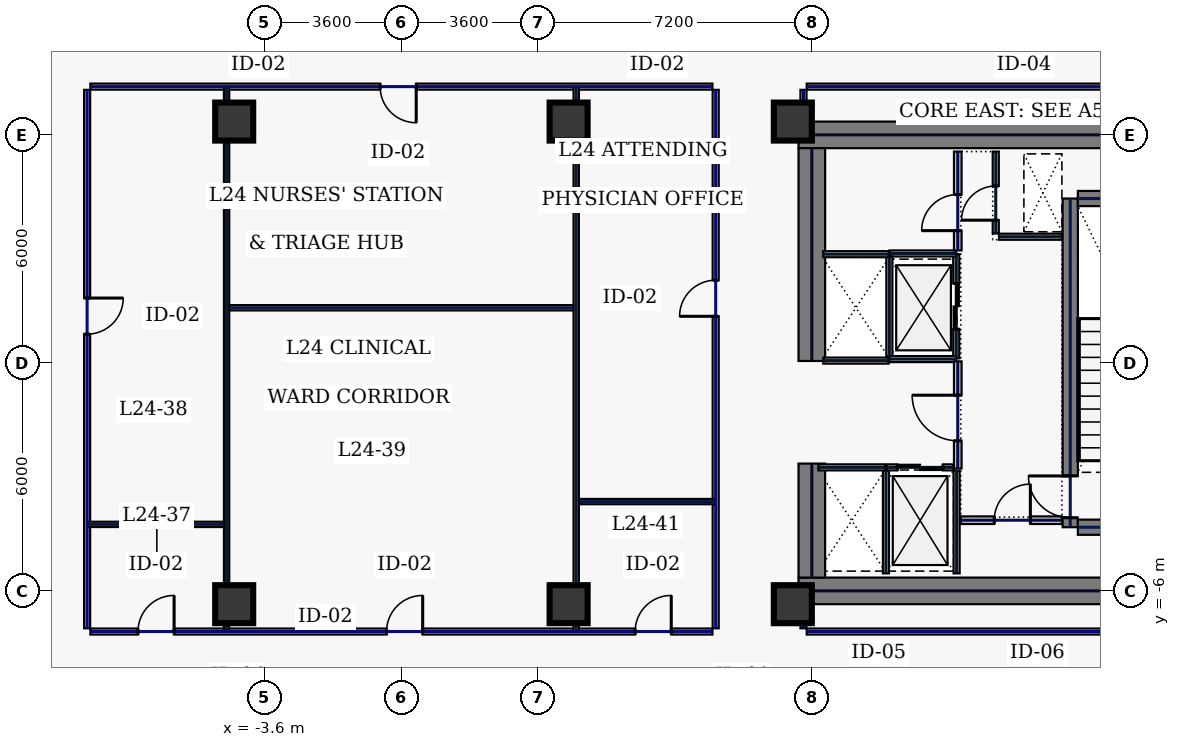
"""IFC4 building model, lengths in metres.
Left out: names, types, materials, properties, quantities, classifications, styles, units other than length and angle.
Written with IfcOpenShell. Run it as: python <this file> out.ifc"""

import sys

from ifc_helpers import new_model, si_unit, direction, frame, frame_2d, origin, origin_2d, place, context, subcontext, project, spatial, rectangle, hollow_rectangle, extrude, element, fill, save


model = new_model("IFC4")
c1 = context("Model", 3, precision=1e-05, world=origin(), true_north=direction((0.0, 1.0)))
c2 = subcontext(c1, "Body", "Model", "MODEL_VIEW")
j1 = project(units=[si_unit("LENGTHUNIT", "METRE"), si_unit("PLANEANGLEUNIT", "RADIAN")], contexts=[c1])
p1 = place(None, origin())
s1 = spatial("IfcSite", under=j1, at=p1, CompositionType="ELEMENT")
p2 = place(p1, origin())
s2 = spatial("IfcBuilding", under=s1, at=p2, CompositionType="ELEMENT")
p3 = place(p2, frame((0.0, 0.0, 109.4)))
s3 = spatial("IfcBuildingStorey", under=s2, at=p3, CompositionType="ELEMENT", Elevation=109.4)
for number, where, z_axis, x_axis in (
    (1, (10.45, 6.0, 0.0), (0.0, 0.0, 1.0), (1.0, 0.0, 0.0)),
    (2, (10.45, -6.0, 0.0), (0.0, 0.0, 1.0), (1.0, 0.0, 0.0)),
):
    element("IfcWall", number, at=place(p3, frame(where, z_axis=z_axis, x_axis=x_axis)), inside=s3, PredefinedType="SHEAR", context=c2, shape_type="SweptSolid", body=[
        extrude(rectangle(XDim=11.55, YDim=0.7, at=frame_2d((5.775, 0.0))), origin(), (0.0, 0.0, 1.0), 3.74),
    ])
p4 = place(p3, frame((10.8, -5.65, 0.0), z_axis=(0.0, 0.0, 1.0), x_axis=(0.0, 1.0, 0.0)))
e3 = element("IfcWall", 3, at=p4, inside=s3, PredefinedType="SHEAR", context=c2, shape_type="SweptSolid", body=[
    extrude(rectangle(XDim=3.0, YDim=0.7, at=frame_2d((1.5, 0.0))), origin(), (0.0, 0.0, 1.0), 3.74),
])
p5 = place(p3, frame((10.8, 0.05, 0.0), z_axis=(0.0, 0.0, 1.0), x_axis=(0.0, 1.0, 0.0)))
e4 = element("IfcWall", 4, at=p5, inside=s3, PredefinedType="SHEAR", context=c2, shape_type="SweptSolid", body=[
    extrude(rectangle(XDim=5.6, YDim=0.7, at=frame_2d((2.8, 0.0))), origin(), (0.0, 0.0, 1.0), 3.74),
])
p6 = place(p3, frame((17.6, -4.325, 0.0), z_axis=(0.0, 0.0, 1.0), x_axis=(0.0, 1.0, 0.0)))
e5 = element("IfcWall", 5, at=p6, inside=s3, PredefinedType="SHEAR", context=c2, shape_type="SweptSolid", body=[
    extrude(rectangle(XDim=8.65, YDim=0.4, at=frame_2d((4.325, 0.0))), origin(), (0.0, 0.0, 1.0), 3.74),
])
p7 = place(p6, frame((0.25, 0.0, 0.0)))
e6 = element("IfcOpeningElement", 6, at=p7, cuts=e5, PredefinedType="OPENING", context=c2, shape_type="SweptSolid", body=[
    extrude(rectangle(XDim=1.1, YDim=2.2, at=frame_2d((0.55, 1.1))), frame((0.0, 0.21, 0.0), z_axis=(0.0, -1.0, 0.0), x_axis=(1.0, 0.0, 0.0)), (0.0, 0.0, 1.0), 0.42),
])
for number, where, z_axis, x_axis in (
    (7, (17.8, -4.325, 0.0), (0.0, 0.0, 1.0), (1.0, 0.0, 0.0)),
    (8, (17.8, 4.325, 0.0), (0.0, 0.0, 1.0), (1.0, 0.0, 0.0)),
):
    element("IfcWall", number, at=place(p3, frame(where, z_axis=z_axis, x_axis=x_axis)), inside=s3, PredefinedType="SHEAR", context=c2, shape_type="SweptSolid", body=[
        extrude(rectangle(XDim=3.4, YDim=0.4, at=frame_2d((1.7, 0.0))), origin(), (0.0, 0.0, 1.0), 3.74),
    ])
for number, where, z_axis, x_axis in (
    (9, (10.3, -6.35, 0.0), (0.0, 0.0, 1.0), (1.0, 0.0, 0.0)),
    (10, (10.3, 6.35, 0.0), (0.0, 0.0, 1.0), (1.0, 0.0, 0.0)),
    (11, (-4.4, -6.35, 0.0), (0.0, 0.0, 1.0), (1.0, 0.0, 0.0)),
    (12, (4.4, -6.35, 0.0), (0.0, 0.0, 1.0), (1.0, 0.0, 0.0)),
    (13, (-4.4, 6.35, 0.0), (0.0, 0.0, 1.0), (1.0, 0.0, 0.0)),
    (14, (4.4, 6.35, 0.0), (0.0, 0.0, 1.0), (1.0, 0.0, 0.0)),
):
    element("IfcColumn", number, at=place(p3, frame(where, z_axis=z_axis, x_axis=x_axis)), inside=s3, PredefinedType="COLUMN", context=c2, shape_type="SweptSolid", body=[
        extrude(hollow_rectangle(XDim=1.0, YDim=1.0, WallThickness=0.045, at=origin_2d()), origin(), (0.0, 0.0, 1.0), 3.74),
    ])
p8 = place(p3, frame((14.6, 0.12, 0.0), z_axis=(0.0, 0.0, 1.0), x_axis=(0.0, 1.0, 0.0)))
e15 = element("IfcWall", 15, at=p8, inside=s3, PredefinedType="PARTITIONING", context=c2, shape_type="SweptSolid", body=[
    extrude(rectangle(XDim=2.74, YDim=0.16, at=frame_2d((1.37, 0.0))), origin(), (0.0, 0.0, 1.0), 3.74),
])
p9 = place(p8, frame((0.77, 0.0, 0.0)))
e16 = element("IfcOpeningElement", 16, at=p9, cuts=e15, PredefinedType="OPENING", context=c2, shape_type="SweptSolid", body=[
    extrude(rectangle(XDim=1.2, YDim=2.2, at=frame_2d((0.6, 1.1))), frame((0.0, 0.09, 0.0), z_axis=(0.0, -1.0, 0.0), x_axis=(1.0, 0.0, 0.0)), (0.0, 0.0, 1.0), 0.18),
])
for number, where, z_axis, x_axis in (
    (17, (12.84, 0.1, 0.0), (0.0, 0.0, 1.0), (1.0, 0.0, 0.0)),
    (18, (12.84, 2.88, 0.0), (0.0, 0.0, 1.0), (1.0, 0.0, 0.0)),
):
    element("IfcWall", number, at=place(p3, frame(where, z_axis=z_axis, x_axis=x_axis)), inside=s3, PredefinedType="PARTITIONING", context=c2, shape_type="SweptSolid", body=[
        extrude(rectangle(XDim=1.76, YDim=0.16, at=frame_2d((0.88, 0.0))), origin(), (0.0, 0.0, 1.0), 3.74),
    ])
p10 = place(p3, frame((12.84, 0.18, 0.0), z_axis=(0.0, 0.0, 1.0), x_axis=(0.0, 1.0, 0.0)))
e19 = element("IfcWall", 19, at=p10, inside=s3, PredefinedType="PARTITIONING", context=c2, shape_type="SweptSolid", body=[
    extrude(rectangle(XDim=2.62, YDim=0.16, at=frame_2d((1.31, 0.0))), origin(), (0.0, 0.0, 1.0), 3.74),
])
p11 = place(p3, frame((12.77, -2.75, 0.0), z_axis=(0.0, 0.0, 1.0), x_axis=(1.0, 0.0, 0.0)))
e20 = element("IfcWall", 20, at=p11, inside=s3, PredefinedType="PARTITIONING", context=c2, shape_type="SweptSolid", body=[
    extrude(rectangle(XDim=1.76, YDim=0.16, at=frame_2d((0.88, 0.0))), origin(), (0.0, 0.0, 1.0), 3.74),
])
p12 = place(p11, frame((0.28, 0.0, 0.0)))
e21 = element("IfcOpeningElement", 21, at=p12, cuts=e20, PredefinedType="OPENING", context=c2, shape_type="SweptSolid", body=[
    extrude(rectangle(XDim=1.2, YDim=2.2, at=frame_2d((0.6, 1.1))), frame((0.0, 0.09, 0.0), z_axis=(0.0, -1.0, 0.0), x_axis=(1.0, 0.0, 0.0)), (0.0, 0.0, 1.0), 0.18),
])
for number, where, z_axis, x_axis in (
    (22, (12.75, -5.54, 0.0), (0.0, 0.0, 1.0), (0.0, 1.0, 0.0)),
    (23, (14.61, -5.54, 0.0), (0.0, 0.0, 1.0), (0.0, 1.0, 0.0)),
):
    element("IfcWall", number, at=place(p3, frame(where, z_axis=z_axis, x_axis=x_axis)), inside=s3, PredefinedType="PARTITIONING", context=c2, shape_type="SweptSolid", body=[
        extrude(rectangle(XDim=2.7, YDim=0.16, at=frame_2d((1.35, 0.0))), origin(), (0.0, 0.0, 1.0), 3.74),
    ])
p13 = place(p3, frame((10.97, -2.75, 0.0), z_axis=(0.0, 0.0, 1.0), x_axis=(1.0, 0.0, 0.0)))
e24 = element("IfcWall", 24, at=p13, inside=s3, PredefinedType="PARTITIONING", context=c2, shape_type="SweptSolid", body=[
    extrude(rectangle(XDim=1.76, YDim=0.16, at=frame_2d((0.88, 0.0))), origin(), (0.0, 0.0, 1.0), 3.74),
])
for number, where, z_axis, x_axis in (
    (25, (11.1, 0.06, 0.0), (0.0, 0.0, 1.0), (1.0, 0.0, 0.0)),
    (26, (11.1, 2.86, 0.0), (0.0, 0.0, 1.0), (1.0, 0.0, 0.0)),
):
    element("IfcWall", number, at=place(p3, frame(where, z_axis=z_axis, x_axis=x_axis)), inside=s3, PredefinedType="PARTITIONING", context=c2, shape_type="SweptSolid", body=[
        extrude(rectangle(XDim=1.72, YDim=0.16, at=frame_2d((0.86, 0.0))), origin(), (0.0, 0.0, 1.0), 3.74),
    ])
p14 = place(p3, frame((15.64, 3.405, 0.0), z_axis=(0.0, 0.0, 1.0), x_axis=(0.0, 1.0, 0.0)))
e27 = element("IfcWall", 27, at=p14, inside=s3, PredefinedType="PARTITIONING", context=c2, shape_type="SweptSolid", body=[
    extrude(rectangle(XDim=2.155, YDim=0.16, at=frame_2d((1.078, 0.0))), origin(), (0.0, 0.0, 1.0), 3.74),
])
p15 = place(p14, frame((0.35, 0.0, 0.0)))
e28 = element("IfcOpeningElement", 28, at=p15, cuts=e27, PredefinedType="OPENING", context=c2, shape_type="SweptSolid", body=[
    extrude(rectangle(XDim=0.9, YDim=2.2, at=frame_2d((0.45, 1.1))), frame((0.0, 0.09, 0.0), z_axis=(0.0, -1.0, 0.0), x_axis=(1.0, 0.0, 0.0)), (0.0, 0.0, 1.0), 0.18),
])
p16 = place(p3, frame((15.725, 3.32, 0.0), z_axis=(0.0, 0.0, 1.0), x_axis=(1.0, 0.0, 0.0)))
e29 = element("IfcWall", 29, at=p16, inside=s3, PredefinedType="PARTITIONING", context=c2, shape_type="SweptSolid", body=[
    extrude(rectangle(XDim=1.655, YDim=0.16, at=frame_2d((0.827, 0.0))), origin(), (0.0, 0.0, 1.0), 3.74),
])
p17 = place(p3, frame((14.72, -4.14, 0.0), z_axis=(0.0, 0.0, 1.0), x_axis=(1.0, 0.0, 0.0)))
e30 = element("IfcWall", 30, at=p17, inside=s3, PredefinedType="SOLIDWALL", context=c2, shape_type="SweptSolid", body=[
    extrude(rectangle(XDim=2.66, YDim=0.2, at=frame_2d((1.33, 0.0))), origin(), (0.0, 0.0, 1.0), 3.74),
])
p18 = place(p17, frame((0.88, 0.0, 0.0)))
e31 = element("IfcOpeningElement", 31, at=p18, cuts=e30, PredefinedType="OPENING", context=c2, shape_type="SweptSolid", body=[
    extrude(rectangle(XDim=0.95, YDim=2.2, at=frame_2d((0.475, 1.1))), frame((0.0, 0.11, 0.0), z_axis=(0.0, -1.0, 0.0), x_axis=(1.0, 0.0, 0.0)), (0.0, 0.0, 1.0), 0.22),
])
p19 = place(p3, frame((14.64, 2.96, 0.0), z_axis=(0.0, 0.0, 1.0), x_axis=(0.0, 1.0, 0.0)))
e32 = element("IfcWall", 32, at=p19, inside=s3, PredefinedType="SOLIDWALL", context=c2, shape_type="SweptSolid", body=[
    extrude(rectangle(XDim=2.6, YDim=0.2, at=frame_2d((1.3, 0.0))), origin(), (0.0, 0.0, 1.0), 3.74),
])
p20 = place(p19, frame((0.52, 0.0, 0.0)))
e33 = element("IfcOpeningElement", 33, at=p20, cuts=e32, PredefinedType="OPENING", context=c2, shape_type="SweptSolid", body=[
    extrude(rectangle(XDim=0.95, YDim=2.2, at=frame_2d((0.475, 1.1))), frame((0.0, 0.11, 0.0), z_axis=(0.0, -1.0, 0.0), x_axis=(1.0, 0.0, 0.0)), (0.0, 0.0, 1.0), 0.22),
])
p21 = place(p3, frame((14.64, -2.78, 0.0), z_axis=(0.0, 0.0, 1.0), x_axis=(0.0, 1.0, 0.0)))
e34 = element("IfcWall", 34, at=p21, inside=s3, PredefinedType="SOLIDWALL", context=c2, shape_type="SweptSolid", body=[
    extrude(rectangle(XDim=2.82, YDim=0.2, at=frame_2d((1.41, 0.0))), origin(), (0.0, 0.0, 1.0), 3.74),
])
p22 = place(p21, frame((0.73, 0.0, 0.0)))
e35 = element("IfcOpeningElement", 35, at=p22, cuts=e34, PredefinedType="OPENING", context=c2, shape_type="SweptSolid", body=[
    extrude(rectangle(XDim=1.2, YDim=2.2, at=frame_2d((0.6, 1.1))), frame((0.0, 0.11, 0.0), z_axis=(0.0, -1.0, 0.0), x_axis=(1.0, 0.0, 0.0)), (0.0, 0.0, 1.0), 0.22),
])
p23 = place(p3, frame((25.235, 7.27, 0.0), z_axis=(0.0, 0.0, 1.0), x_axis=(-1.0, 0.0, 0.0)))
e36 = element("IfcWall", 36, at=p23, inside=s3, PredefinedType="PARTITIONING", context=c2, shape_type="SweptSolid", body=[
    extrude(rectangle(XDim=14.57, YDim=0.16, at=frame_2d((7.285, 0.0))), origin(), (0.0, 0.0, 1.0), 3.74),
])
p24 = place(p3, frame((10.58, 7.185, 0.0), z_axis=(0.0, 0.0, 1.0), x_axis=(0.0, -1.0, 0.0)))
e37 = element("IfcWall", 37, at=p24, inside=s3, PredefinedType="PARTITIONING", context=c2, shape_type="SweptSolid", body=[
    extrude(rectangle(XDim=0.765, YDim=0.16, at=frame_2d((0.383, 0.0))), origin(), (0.0, 0.0, 1.0), 1.535),
])
p25 = place(p3, frame((10.58, -6.42, 0.0), z_axis=(0.0, 0.0, 1.0), x_axis=(0.0, -1.0, 0.0)))
e38 = element("IfcWall", 38, at=p25, inside=s3, PredefinedType="PARTITIONING", context=c2, shape_type="SweptSolid", body=[
    extrude(rectangle(XDim=0.565, YDim=0.16, at=frame_2d((0.283, 0.0))), origin(), (0.0, 0.0, 1.0), 3.74),
])
p26 = place(p3, frame((10.665, -7.07, 0.0), z_axis=(0.0, 0.0, 1.0), x_axis=(1.0, 0.0, 0.0)))
e39 = element("IfcWall", 39, at=p26, inside=s3, PredefinedType="PARTITIONING", context=c2, shape_type="SweptSolid", body=[
    extrude(rectangle(XDim=14.57, YDim=0.16, at=frame_2d((7.285, 0.0))), origin(), (0.0, 0.0, 1.0), 3.74),
])
p27 = place(p3, frame((8.27, -6.985, 0.0), z_axis=(0.0, 0.0, 1.0), x_axis=(0.0, 1.0, 0.0)))
e40 = element("IfcWall", 40, at=p27, inside=s3, PredefinedType="PARTITIONING", context=c2, shape_type="SweptSolid", body=[
    extrude(rectangle(XDim=14.17, YDim=0.16, at=frame_2d((7.085, 0.0))), origin(), (0.0, 0.0, 1.0), 3.74),
])
p28 = place(p27, frame((8.211, 0.0, 0.0)))
e41 = element("IfcOpeningElement", 41, at=p28, cuts=e40, PredefinedType="OPENING", context=c2, shape_type="SweptSolid", body=[
    extrude(rectangle(XDim=0.95, YDim=2.2, at=frame_2d((0.475, 1.1))), frame((0.0, 0.09, 0.0), z_axis=(0.0, -1.0, 0.0), x_axis=(1.0, 0.0, 0.0)), (0.0, 0.0, 1.0), 0.18),
])
p29 = place(p3, frame((8.185, 7.27, 0.0), z_axis=(0.0, 0.0, 1.0), x_axis=(-1.0, 0.0, 0.0)))
e42 = element("IfcWall", 42, at=p29, inside=s3, PredefinedType="PARTITIONING", context=c2, shape_type="SweptSolid", body=[
    extrude(rectangle(XDim=16.37, YDim=0.16, at=frame_2d((8.185, 0.0))), origin(), (0.0, 0.0, 1.0), 3.74),
])
p30 = place(p29, frame((7.795, 0.0, 0.0)))
e43 = element("IfcOpeningElement", 43, at=p30, cuts=e42, PredefinedType="OPENING", context=c2, shape_type="SweptSolid", body=[
    extrude(rectangle(XDim=0.95, YDim=2.2, at=frame_2d((0.475, 1.1))), frame((0.0, 0.09, 0.0), z_axis=(0.0, -1.0, 0.0), x_axis=(1.0, 0.0, 0.0)), (0.0, 0.0, 1.0), 0.18),
])
p31 = place(p3, frame((-8.27, 7.185, 0.0), z_axis=(0.0, 0.0, 1.0), x_axis=(0.0, -1.0, 0.0)))
e44 = element("IfcWall", 44, at=p31, inside=s3, PredefinedType="PARTITIONING", context=c2, shape_type="SweptSolid", body=[
    extrude(rectangle(XDim=14.17, YDim=0.16, at=frame_2d((7.085, 0.0))), origin(), (0.0, 0.0, 1.0), 3.74),
])
p32 = place(p31, frame((5.479, 0.0, 0.0)))
e45 = element("IfcOpeningElement", 45, at=p32, cuts=e44, PredefinedType="OPENING", context=c2, shape_type="SweptSolid", body=[
    extrude(rectangle(XDim=0.95, YDim=2.2, at=frame_2d((0.475, 1.1))), frame((0.0, 0.09, 0.0), z_axis=(0.0, -1.0, 0.0), x_axis=(1.0, 0.0, 0.0)), (0.0, 0.0, 1.0), 0.18),
])
p33 = place(p3, frame((-8.185, -7.07, 0.0), z_axis=(0.0, 0.0, 1.0), x_axis=(1.0, 0.0, 0.0)))
e46 = element("IfcWall", 46, at=p33, inside=s3, PredefinedType="PARTITIONING", context=c2, shape_type="SweptSolid", body=[
    extrude(rectangle(XDim=16.37, YDim=0.16, at=frame_2d((8.185, 0.0))), origin(), (0.0, 0.0, 1.0), 3.74),
])
p34 = place(p33, frame((1.254, 0.0, 0.0)))
e47 = element("IfcOpeningElement", 47, at=p34, cuts=e46, PredefinedType="OPENING", context=c2, shape_type="SweptSolid", body=[
    extrude(rectangle(XDim=0.95, YDim=2.2, at=frame_2d((0.475, 1.1))), frame((0.0, 0.09, 0.0), z_axis=(0.0, -1.0, 0.0), x_axis=(1.0, 0.0, 0.0)), (0.0, 0.0, 1.0), 0.18),
])
p35 = place(p33, frame((7.795, 0.0, 0.0)))
e48 = element("IfcOpeningElement", 48, at=p35, cuts=e46, PredefinedType="OPENING", context=c2, shape_type="SweptSolid", body=[
    extrude(rectangle(XDim=0.95, YDim=2.2, at=frame_2d((0.475, 1.1))), frame((0.0, 0.09, 0.0), z_axis=(0.0, -1.0, 0.0), x_axis=(1.0, 0.0, 0.0)), (0.0, 0.0, 1.0), 0.18),
])
p36 = place(p33, frame((14.336, 0.0, 0.0)))
e49 = element("IfcOpeningElement", 49, at=p36, cuts=e46, PredefinedType="OPENING", context=c2, shape_type="SweptSolid", body=[
    extrude(rectangle(XDim=0.95, YDim=2.2, at=frame_2d((0.475, 1.1))), frame((0.0, 0.09, 0.0), z_axis=(0.0, -1.0, 0.0), x_axis=(1.0, 0.0, 0.0)), (0.0, 0.0, 1.0), 0.18),
])
for number, where, z_axis, x_axis in (
    (50, (-4.6, -7.065, 0.0), (0.0, 0.0, 1.0), (0.0, 1.0, 0.0)),
    (51, (4.6, -7.065, 0.0), (0.0, 0.0, 1.0), (0.0, 1.0, 0.0)),
):
    element("IfcWall", number, at=place(p3, frame(where, z_axis=z_axis, x_axis=x_axis)), inside=s3, PredefinedType="PARTITIONING", context=c2, shape_type="SweptSolid", body=[
        extrude(rectangle(XDim=14.33, YDim=0.14, at=frame_2d((7.165, 0.0))), origin(), (0.0, 0.0, 1.0), 2.935),
    ])
p37 = place(p3, frame((-4.525, 1.45, 0.0), z_axis=(0.0, 0.0, 1.0), x_axis=(1.0, 0.0, 0.0)))
e52 = element("IfcWall", 52, at=p37, inside=s3, PredefinedType="PARTITIONING", context=c2, shape_type="SweptSolid", body=[
    extrude(rectangle(XDim=9.05, YDim=0.14, at=frame_2d((4.525, 0.0))), origin(), (0.0, 0.0, 1.0), 3.74),
])
for number, where, z_axis, x_axis in (
    (53, (-8.265, -4.25, 0.0), (0.0, 0.0, 1.0), (1.0, 0.0, 0.0)),
    (54, (4.675, -3.65, 0.0), (0.0, 0.0, 1.0), (1.0, 0.0, 0.0)),
):
    element("IfcWall", number, at=place(p3, frame(where, z_axis=z_axis, x_axis=x_axis)), inside=s3, PredefinedType="PARTITIONING", context=c2, shape_type="SweptSolid", body=[
        extrude(rectangle(XDim=3.59, YDim=0.14, at=frame_2d((1.795, 0.0))), origin(), (0.0, 0.0, 1.0), 3.74),
    ])
p38 = place(p7, origin())
e55 = element("IfcDoor", 55, at=p38, inside=s3, OperationType="SINGLE_SWING_RIGHT", PredefinedType="DOOR", context=c2, shape_type="SweptSolid", body=[
    extrude(rectangle(XDim=1.1, YDim=2.2, at=frame_2d((0.55, 1.1))), frame((0.0, 0.025, 0.0), z_axis=(0.0, -1.0, 0.0), x_axis=(1.0, 0.0, 0.0)), (0.0, 0.0, 1.0), 0.05),
])
fill(e6, e55)
p39 = place(p9, origin())
e56 = element("IfcDoor", 56, at=p39, inside=s3, OperationType="SLIDING_TO_LEFT", PredefinedType="DOOR", context=c2, shape_type="SweptSolid", body=[
    extrude(rectangle(XDim=1.2, YDim=2.2, at=frame_2d((0.6, 1.1))), frame((0.0, 0.025, 0.0), z_axis=(0.0, -1.0, 0.0), x_axis=(1.0, 0.0, 0.0)), (0.0, 0.0, 1.0), 0.05),
])
fill(e16, e56)
p40 = place(p12, origin())
e57 = element("IfcDoor", 57, at=p40, inside=s3, OperationType="SLIDING_TO_LEFT", PredefinedType="DOOR", context=c2, shape_type="SweptSolid", body=[
    extrude(rectangle(XDim=1.2, YDim=2.2, at=frame_2d((0.6, 1.1))), frame((0.0, 0.025, 0.0), z_axis=(0.0, -1.0, 0.0), x_axis=(1.0, 0.0, 0.0)), (0.0, 0.0, 1.0), 0.05),
])
fill(e21, e57)
p41 = place(p15, origin())
e58 = element("IfcDoor", 58, at=p41, inside=s3, OperationType="SINGLE_SWING_LEFT", PredefinedType="DOOR", context=c2, shape_type="SweptSolid", body=[
    extrude(rectangle(XDim=0.9, YDim=2.2, at=frame_2d((0.45, 1.1))), frame((0.0, 0.025, 0.0), z_axis=(0.0, -1.0, 0.0), x_axis=(1.0, 0.0, 0.0)), (0.0, 0.0, 1.0), 0.05),
])
fill(e28, e58)
p42 = place(p18, origin())
e59 = element("IfcDoor", 59, at=p42, inside=s3, OperationType="SINGLE_SWING_RIGHT", PredefinedType="DOOR", context=c2, shape_type="SweptSolid", body=[
    extrude(rectangle(XDim=0.95, YDim=2.2, at=frame_2d((0.475, 1.1))), frame((0.0, 0.025, 0.0), z_axis=(0.0, -1.0, 0.0), x_axis=(1.0, 0.0, 0.0)), (0.0, 0.0, 1.0), 0.05),
])
fill(e31, e59)
p43 = place(p20, origin())
e60 = element("IfcDoor", 60, at=p43, inside=s3, OperationType="SINGLE_SWING_LEFT", PredefinedType="DOOR", context=c2, shape_type="SweptSolid", body=[
    extrude(rectangle(XDim=0.95, YDim=2.2, at=frame_2d((0.475, 1.1))), frame((0.0, 0.025, 0.0), z_axis=(0.0, -1.0, 0.0), x_axis=(1.0, 0.0, 0.0)), (0.0, 0.0, 1.0), 0.05),
])
fill(e33, e60)
p44 = place(p22, origin())
e61 = element("IfcDoor", 61, at=p44, inside=s3, OperationType="SINGLE_SWING_RIGHT", PredefinedType="DOOR", context=c2, shape_type="SweptSolid", body=[
    extrude(rectangle(XDim=1.2, YDim=2.2, at=frame_2d((0.6, 1.1))), frame((0.0, 0.025, 0.0), z_axis=(0.0, -1.0, 0.0), x_axis=(1.0, 0.0, 0.0)), (0.0, 0.0, 1.0), 0.05),
])
fill(e35, e61)
p45 = place(p34, origin())
e62 = element("IfcDoor", 62, at=p45, inside=s3, OperationType="SINGLE_SWING_RIGHT", PredefinedType="DOOR", context=c2, shape_type="SweptSolid", body=[
    extrude(rectangle(XDim=0.95, YDim=2.2, at=frame_2d((0.475, 1.1))), frame((0.0, 0.025, 0.0), z_axis=(0.0, -1.0, 0.0), x_axis=(1.0, 0.0, 0.0)), (0.0, 0.0, 1.0), 0.05),
])
fill(e47, e62)
p46 = place(p32, origin())
e63 = element("IfcDoor", 63, at=p46, inside=s3, OperationType="SINGLE_SWING_LEFT", PredefinedType="DOOR", context=c2, shape_type="SweptSolid", body=[
    extrude(rectangle(XDim=0.95, YDim=2.2, at=frame_2d((0.475, 1.1))), frame((0.0, 0.025, 0.0), z_axis=(0.0, -1.0, 0.0), x_axis=(1.0, 0.0, 0.0)), (0.0, 0.0, 1.0), 0.05),
])
fill(e45, e63)
p47 = place(p35, origin())
e64 = element("IfcDoor", 64, at=p47, inside=s3, OperationType="SINGLE_SWING_RIGHT", PredefinedType="DOOR", context=c2, shape_type="SweptSolid", body=[
    extrude(rectangle(XDim=0.95, YDim=2.2, at=frame_2d((0.475, 1.1))), frame((0.0, 0.025, 0.0), z_axis=(0.0, -1.0, 0.0), x_axis=(1.0, 0.0, 0.0)), (0.0, 0.0, 1.0), 0.05),
])
fill(e48, e64)
p48 = place(p30, origin())
e65 = element("IfcDoor", 65, at=p48, inside=s3, OperationType="SINGLE_SWING_LEFT", PredefinedType="DOOR", context=c2, shape_type="SweptSolid", body=[
    extrude(rectangle(XDim=0.95, YDim=2.2, at=frame_2d((0.475, 1.1))), frame((0.0, 0.025, 0.0), z_axis=(0.0, -1.0, 0.0), x_axis=(1.0, 0.0, 0.0)), (0.0, 0.0, 1.0), 0.05),
])
fill(e43, e65)
p49 = place(p36, origin())
e66 = element("IfcDoor", 66, at=p49, inside=s3, OperationType="SINGLE_SWING_RIGHT", PredefinedType="DOOR", context=c2, shape_type="SweptSolid", body=[
    extrude(rectangle(XDim=0.95, YDim=2.2, at=frame_2d((0.475, 1.1))), frame((0.0, 0.025, 0.0), z_axis=(0.0, -1.0, 0.0), x_axis=(1.0, 0.0, 0.0)), (0.0, 0.0, 1.0), 0.05),
])
fill(e49, e66)
p50 = place(p28, origin())
e67 = element("IfcDoor", 67, at=p50, inside=s3, OperationType="SINGLE_SWING_LEFT", PredefinedType="DOOR", context=c2, shape_type="SweptSolid", body=[
    extrude(rectangle(XDim=0.95, YDim=2.2, at=frame_2d((0.475, 1.1))), frame((0.0, 0.025, 0.0), z_axis=(0.0, -1.0, 0.0), x_axis=(1.0, 0.0, 0.0)), (0.0, 0.0, 1.0), 0.05),
])
fill(e41, e67)
save(model, sys.argv[1])
